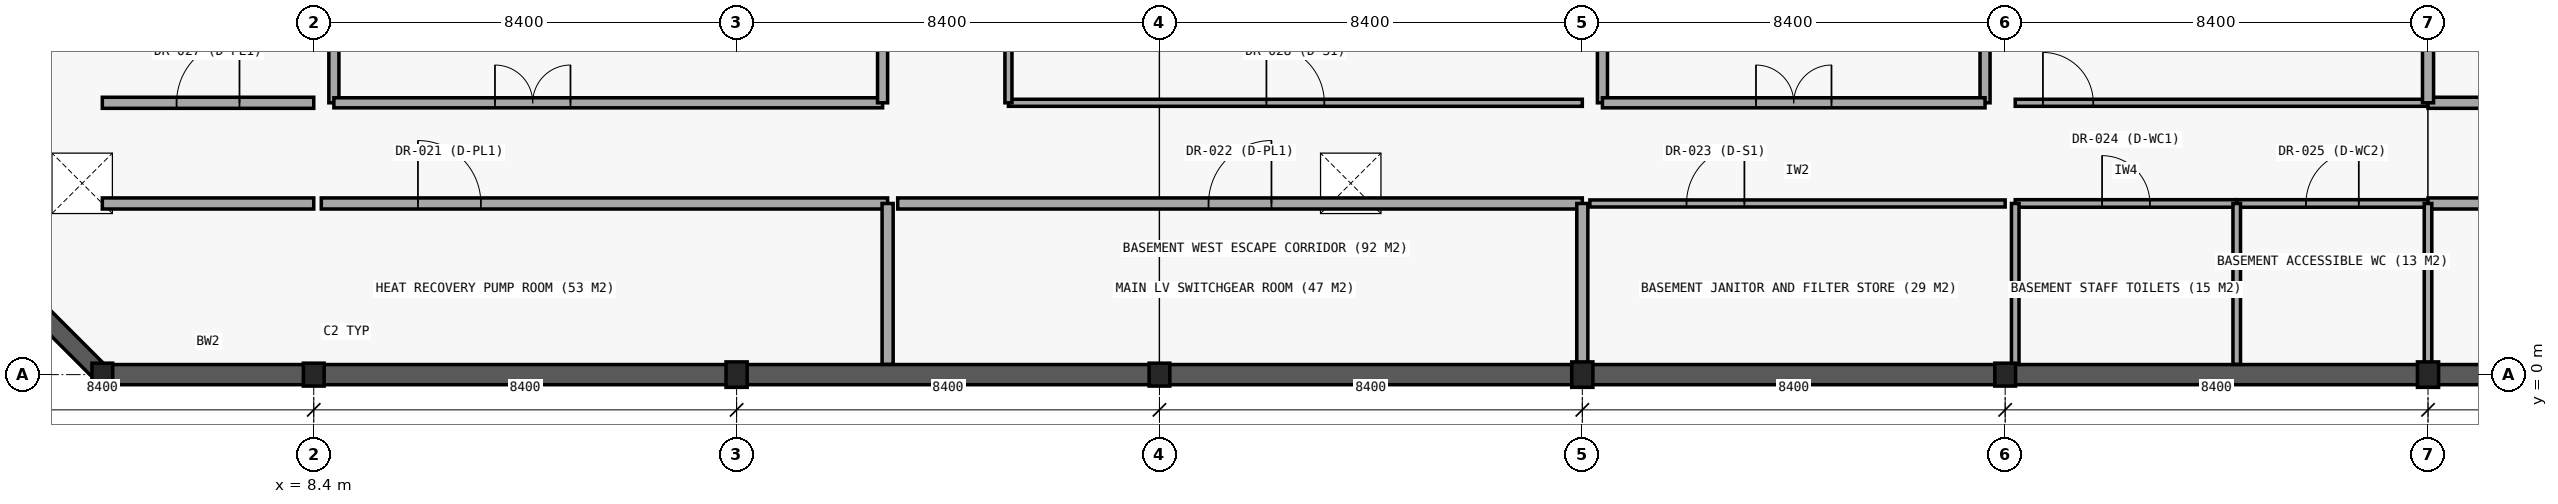
"""IFC4 building model, lengths in metres.
Left out: names, types, materials, properties, quantities, classifications, styles, units other than length and angle.
Written with IfcOpenShell. Run it as: python <this file> out.ifc"""

import sys

from ifc_helpers import new_model, si_unit, direction, frame, frame_2d, origin, origin_2d, place, context, subcontext, project, spatial, rectangle, i_section, extrude, element, fill, save


model = new_model("IFC4")
c1 = context("Model", 3, precision=1e-05, world=origin(), true_north=direction((0.0, 1.0)))
c2 = subcontext(c1, "Body", "Model", "MODEL_VIEW")
j1 = project(units=[si_unit("LENGTHUNIT", "METRE"), si_unit("PLANEANGLEUNIT", "RADIAN")], contexts=[c1])
p1 = place(None, origin())
s1 = spatial("IfcSite", under=j1, at=p1, CompositionType="ELEMENT")
p2 = place(p1, origin())
s2 = spatial("IfcBuilding", under=s1, at=p2, CompositionType="ELEMENT")
p3 = place(p2, frame((0.0, 0.0, -4.5)))
s3 = spatial("IfcBuildingStorey", under=s2, at=p3, CompositionType="ELEMENT", Elevation=-4.5)
p4 = place(p3, frame((4.2, 0.0, -0.35), z_axis=(0.0, 0.0, 1.0), x_axis=(1.0, 0.0, 0.0)))
e1 = element("IfcWall", 1, at=p4, inside=s3, PredefinedType="SOLIDWALL", context=c2, shape_type="SweptSolid", body=[
    extrude(rectangle(XDim=4.2, YDim=0.4, at=frame_2d((2.1, 0.0))), origin(), (0.0, 0.0, 1.0), 4.6),
])
p5 = place(p3, frame((8.4, 0.0, -0.35), z_axis=(0.0, 0.0, 1.0), x_axis=(1.0, 0.0, 0.0)))
e2 = element("IfcWall", 2, at=p5, inside=s3, PredefinedType="SOLIDWALL", context=c2, shape_type="SweptSolid", body=[
    extrude(rectangle(XDim=8.4, YDim=0.4, at=frame_2d((4.2, 0.0))), origin(), (0.0, 0.0, 1.0), 4.6),
])
p6 = place(p3, frame((16.8, 0.0, -0.35), z_axis=(0.0, 0.0, 1.0), x_axis=(1.0, 0.0, 0.0)))
e3 = element("IfcWall", 3, at=p6, inside=s3, PredefinedType="SOLIDWALL", context=c2, shape_type="SweptSolid", body=[
    extrude(rectangle(XDim=8.4, YDim=0.4, at=frame_2d((4.2, 0.0))), origin(), (0.0, 0.0, 1.0), 4.6),
])
p7 = place(p3, frame((25.2, 0.0, -0.35), z_axis=(0.0, 0.0, 1.0), x_axis=(1.0, 0.0, 0.0)))
e4 = element("IfcWall", 4, at=p7, inside=s3, PredefinedType="SOLIDWALL", context=c2, shape_type="SweptSolid", body=[
    extrude(rectangle(XDim=8.4, YDim=0.4, at=frame_2d((4.2, 0.0))), origin(), (0.0, 0.0, 1.0), 4.6),
])
for number, where, z_axis, x_axis in (
    (5, (33.6, 0.0, -0.35), (0.0, 0.0, 1.0), (1.0, 0.0, 0.0)),
    (6, (42.0, 0.0, -0.35), (0.0, 0.0, 1.0), (1.0, 0.0, 0.0)),
):
    element("IfcWall", number, at=place(p3, frame(where, z_axis=z_axis, x_axis=x_axis)), inside=s3, PredefinedType="SOLIDWALL", context=c2, shape_type="SweptSolid", body=[
        extrude(rectangle(XDim=8.4, YDim=0.4, at=frame_2d((4.2, 0.0))), origin(), (0.0, 0.0, 1.0), 4.6),
    ])
p8 = place(p3, frame((50.4, 0.0, -0.35), z_axis=(0.0, 0.0, 1.0), x_axis=(1.0, 0.0, 0.0)))
e7 = element("IfcWall", 7, at=p8, inside=s3, PredefinedType="SOLIDWALL", context=c2, shape_type="SweptSolid", body=[
    extrude(rectangle(XDim=8.4, YDim=0.4, at=frame_2d((4.2, 0.0))), origin(), (0.0, 0.0, 1.0), 4.6),
])
p9 = place(p3, frame((0.0, 4.2, -0.35), z_axis=(0.0, 0.0, 1.0), x_axis=(0.707106781187, -0.707106781187, 0.0)))
e8 = element("IfcWall", 8, at=p9, inside=s3, PredefinedType="SOLIDWALL", context=c2, shape_type="SweptSolid", body=[
    extrude(rectangle(XDim=5.94, YDim=0.35, at=frame_2d((2.97, 0.0))), origin(), (0.0, 0.0, 1.0), 4.6),
])
p10 = place(p3, frame((8.4, 0.0, -0.35), z_axis=(0.0, 0.0, 1.0), x_axis=(1.0, 0.0, 0.0)))
e9 = element("IfcColumn", 9, at=p10, inside=s3, PredefinedType="COLUMN", context=c2, shape_type="SweptSolid", body=[
    extrude(i_section(OverallWidth=0.412, OverallDepth=0.455, WebThickness=0.031, FlangeThickness=0.049, FilletRadius=0.015, at=origin_2d()), origin(), (0.0, 0.0, 1.0), 4.85),
])
p11 = place(p3, frame((16.8, 0.0, -0.35), z_axis=(0.0, 0.0, 1.0), x_axis=(1.0, 0.0, 0.0)))
e10 = element("IfcColumn", 10, at=p11, inside=s3, PredefinedType="COLUMN", context=c2, shape_type="SweptSolid", body=[
    extrude(i_section(OverallWidth=0.42, OverallDepth=0.505, WebThickness=0.037, FlangeThickness=0.059, FilletRadius=0.015, at=origin_2d()), origin(), (0.0, 0.0, 1.0), 4.85),
])
p12 = place(p3, frame((25.2, 0.0, -0.35), z_axis=(0.0, 0.0, 1.0), x_axis=(1.0, 0.0, 0.0)))
e11 = element("IfcColumn", 11, at=p12, inside=s3, PredefinedType="COLUMN", context=c2, shape_type="SweptSolid", body=[
    extrude(i_section(OverallWidth=0.412, OverallDepth=0.455, WebThickness=0.031, FlangeThickness=0.049, FilletRadius=0.015, at=origin_2d()), origin(), (0.0, 0.0, 1.0), 4.85),
])
p13 = place(p3, frame((33.6, 0.0, -0.35), z_axis=(0.0, 0.0, 1.0), x_axis=(1.0, 0.0, 0.0)))
e12 = element("IfcColumn", 12, at=p13, inside=s3, PredefinedType="COLUMN", context=c2, shape_type="SweptSolid", body=[
    extrude(i_section(OverallWidth=0.42, OverallDepth=0.505, WebThickness=0.037, FlangeThickness=0.059, FilletRadius=0.015, at=origin_2d()), origin(), (0.0, 0.0, 1.0), 4.85),
])
p14 = place(p3, frame((42.0, 0.0, -0.35), z_axis=(0.0, 0.0, 1.0), x_axis=(1.0, 0.0, 0.0)))
e13 = element("IfcColumn", 13, at=p14, inside=s3, PredefinedType="COLUMN", context=c2, shape_type="SweptSolid", body=[
    extrude(i_section(OverallWidth=0.412, OverallDepth=0.455, WebThickness=0.031, FlangeThickness=0.049, FilletRadius=0.015, at=origin_2d()), origin(), (0.0, 0.0, 1.0), 4.85),
])
p15 = place(p3, frame((50.4, 0.0, -0.35), z_axis=(0.0, 0.0, 1.0), x_axis=(1.0, 0.0, 0.0)))
e14 = element("IfcColumn", 14, at=p15, inside=s3, PredefinedType="COLUMN", context=c2, shape_type="SweptSolid", body=[
    extrude(i_section(OverallWidth=0.42, OverallDepth=0.505, WebThickness=0.037, FlangeThickness=0.059, FilletRadius=0.015, at=origin_2d()), origin(), (0.0, 0.0, 1.0), 4.85),
])
p16 = place(p3, frame((4.2, 0.0, -0.35), z_axis=(0.0, 0.0, 1.0), x_axis=(1.0, 0.0, 0.0)))
e15 = element("IfcColumn", 15, at=p16, inside=s3, PredefinedType="COLUMN", context=c2, shape_type="SweptSolid", body=[
    extrude(i_section(OverallWidth=0.412, OverallDepth=0.455, WebThickness=0.031, FlangeThickness=0.049, FilletRadius=0.015, at=origin_2d()), origin(), (0.0, 0.0, 1.0), 4.85),
])
p17 = place(p3, frame((8.8, 5.4, 0.0), z_axis=(0.0, 0.0, 1.0), x_axis=(0.0, 1.0, 0.0)))
e16 = element("IfcWall", 16, at=p17, inside=s3, PredefinedType="PARTITIONING", context=c2, shape_type="SweptSolid", body=[
    extrude(rectangle(XDim=2.85, YDim=0.2, at=frame_2d((1.425, 0.0))), origin(), (0.0, 0.0, 1.0), 3.82),
])
p18 = place(p3, frame((8.8, 5.4, 0.0), z_axis=(0.0, 0.0, 1.0), x_axis=(1.0, 0.0, 0.0)))
e17 = element("IfcWall", 17, at=p18, inside=s3, PredefinedType="PARTITIONING", context=c2, shape_type="SweptSolid", body=[
    extrude(rectangle(XDim=10.9, YDim=0.2, at=frame_2d((5.45, 0.0))), origin(), (0.0, 0.0, 1.0), 3.82),
])
p19 = place(p18, frame((3.2, 0.0, 0.0)))
e18 = element("IfcOpeningElement", 18, at=p19, cuts=e17, PredefinedType="OPENING", context=c2, shape_type="SweptSolid", body=[
    extrude(rectangle(XDim=1.5, YDim=2.2, at=frame_2d((0.75, 1.1))), frame((0.0, 0.11, 0.0), z_axis=(0.0, -1.0, 0.0), x_axis=(1.0, 0.0, 0.0)), (0.0, 0.0, 1.0), 0.22),
])
p20 = place(p3, frame((19.7, 5.4, 0.0), z_axis=(0.0, 0.0, 1.0), x_axis=(0.0, 1.0, 0.0)))
e19 = element("IfcWall", 19, at=p20, inside=s3, PredefinedType="PARTITIONING", context=c2, shape_type="SweptSolid", body=[
    extrude(rectangle(XDim=9.6, YDim=0.2, at=frame_2d((4.8, 0.0))), origin(), (0.0, 0.0, 1.0), 3.82),
])
for number, where, z_axis, x_axis in (
    (20, (34.0, 5.4, 0.0), (0.0, 0.0, 1.0), (0.0, 1.0, 0.0)),
    (21, (41.6, 5.4, 0.0), (0.0, 0.0, 1.0), (0.0, 1.0, 0.0)),
):
    element("IfcWall", number, at=place(p3, frame(where, z_axis=z_axis, x_axis=x_axis)), inside=s3, PredefinedType="PARTITIONING", context=c2, shape_type="SweptSolid", body=[
        extrude(rectangle(XDim=2.85, YDim=0.2, at=frame_2d((1.425, 0.0))), origin(), (0.0, 0.0, 1.0), 3.75),
    ])
p21 = place(p3, frame((34.0, 5.4, 0.0), z_axis=(0.0, 0.0, 1.0), x_axis=(1.0, 0.0, 0.0)))
e22 = element("IfcWall", 22, at=p21, inside=s3, PredefinedType="PARTITIONING", context=c2, shape_type="SweptSolid", body=[
    extrude(rectangle(XDim=7.6, YDim=0.2, at=frame_2d((3.8, 0.0))), origin(), (0.0, 0.0, 1.0), 3.82),
])
p22 = place(p21, frame((3.05, 0.0, 0.0)))
e23 = element("IfcOpeningElement", 23, at=p22, cuts=e22, PredefinedType="OPENING", context=c2, shape_type="SweptSolid", body=[
    extrude(rectangle(XDim=1.5, YDim=2.2, at=frame_2d((0.75, 1.1))), frame((0.0, 0.11, 0.0), z_axis=(0.0, -1.0, 0.0), x_axis=(1.0, 0.0, 0.0)), (0.0, 0.0, 1.0), 0.22),
])
p23 = place(p3, frame((4.2, 3.4, 0.0), z_axis=(0.0, 0.0, 1.0), x_axis=(1.0, 0.0, 0.0)))
e24 = element("IfcWall", 24, at=p23, inside=s3, PredefinedType="PARTITIONING", context=c2, shape_type="SweptSolid", body=[
    extrude(rectangle(XDim=4.2, YDim=0.22, at=frame_2d((2.1, 0.0))), origin(), (0.0, 0.0, 1.0), 3.8),
])
p24 = place(p3, frame((8.55, 3.4, 0.0), z_axis=(0.0, 0.0, 1.0), x_axis=(1.0, 0.0, 0.0)))
e25 = element("IfcWall", 25, at=p24, inside=s3, PredefinedType="PARTITIONING", context=c2, shape_type="SweptSolid", body=[
    extrude(rectangle(XDim=11.25, YDim=0.22, at=frame_2d((5.625, 0.0))), origin(), (0.0, 0.0, 1.0), 3.8),
])
p25 = place(p24, frame((1.92, 0.0, 0.0)))
e26 = element("IfcOpeningElement", 26, at=p25, cuts=e25, PredefinedType="OPENING", context=c2, shape_type="SweptSolid", body=[
    extrude(rectangle(XDim=1.25, YDim=2.2, at=frame_2d((0.625, 1.1))), frame((0.0, 0.12, 0.0), z_axis=(0.0, -1.0, 0.0), x_axis=(1.0, 0.0, 0.0)), (0.0, 0.0, 1.0), 0.24),
])
p26 = place(p3, frame((20.0, 3.4, 0.0), z_axis=(0.0, 0.0, 1.0), x_axis=(1.0, 0.0, 0.0)))
e27 = element("IfcWall", 27, at=p26, inside=s3, PredefinedType="PARTITIONING", context=c2, shape_type="SweptSolid", body=[
    extrude(rectangle(XDim=13.6, YDim=0.22, at=frame_2d((6.8, 0.0))), origin(), (0.0, 0.0, 1.0), 3.8),
])
p27 = place(p26, frame((6.175, 0.0, 0.0)))
e28 = element("IfcOpeningElement", 28, at=p27, cuts=e27, PredefinedType="OPENING", context=c2, shape_type="SweptSolid", body=[
    extrude(rectangle(XDim=1.25, YDim=2.2, at=frame_2d((0.625, 1.1))), frame((0.0, 0.12, 0.0), z_axis=(0.0, -1.0, 0.0), x_axis=(1.0, 0.0, 0.0)), (0.0, 0.0, 1.0), 0.24),
])
p28 = place(p3, frame((33.75, 3.4, 0.0), z_axis=(0.0, 0.0, 1.0), x_axis=(1.0, 0.0, 0.0)))
e29 = element("IfcWall", 29, at=p28, inside=s3, PredefinedType="PARTITIONING", context=c2, shape_type="SweptSolid", body=[
    extrude(rectangle(XDim=8.25, YDim=0.14, at=frame_2d((4.125, 0.0))), origin(), (0.0, 0.0, 1.0), 3.8),
])
p29 = place(p28, frame((1.92, 0.0, 0.0)))
e30 = element("IfcOpeningElement", 30, at=p29, cuts=e29, PredefinedType="OPENING", context=c2, shape_type="SweptSolid", body=[
    extrude(rectangle(XDim=1.15, YDim=2.15, at=frame_2d((0.575, 1.075))), frame((0.0, 0.08, 0.0), z_axis=(0.0, -1.0, 0.0), x_axis=(1.0, 0.0, 0.0)), (0.0, 0.0, 1.0), 0.16),
])
p30 = place(p3, frame((42.2, 3.4, 0.0), z_axis=(0.0, 0.0, 1.0), x_axis=(1.0, 0.0, 0.0)))
e31 = element("IfcWall", 31, at=p30, inside=s3, PredefinedType="PARTITIONING", context=c2, shape_type="SweptSolid", body=[
    extrude(rectangle(XDim=4.4, YDim=0.15, at=frame_2d((2.2, 0.0))), origin(), (0.0, 0.0, 1.0), 3.8),
])
p31 = place(p30, frame((1.725, 0.0, 0.0)))
e32 = element("IfcOpeningElement", 32, at=p31, cuts=e31, PredefinedType="OPENING", context=c2, shape_type="SweptSolid", body=[
    extrude(rectangle(XDim=0.95, YDim=2.1, at=frame_2d((0.475, 1.05))), frame((0.0, 0.085, 0.0), z_axis=(0.0, -1.0, 0.0), x_axis=(1.0, 0.0, 0.0)), (0.0, 0.0, 1.0), 0.17),
])
p32 = place(p3, frame((46.6, 3.4, 0.0), z_axis=(0.0, 0.0, 1.0), x_axis=(1.0, 0.0, 0.0)))
e33 = element("IfcWall", 33, at=p32, inside=s3, PredefinedType="PARTITIONING", context=c2, shape_type="SweptSolid", body=[
    extrude(rectangle(XDim=3.8, YDim=0.15, at=frame_2d((1.9, 0.0))), origin(), (0.0, 0.0, 1.0), 3.8),
])
p33 = place(p32, frame((1.375, 0.0, 0.0)))
e34 = element("IfcOpeningElement", 34, at=p33, cuts=e33, PredefinedType="OPENING", context=c2, shape_type="SweptSolid", body=[
    extrude(rectangle(XDim=1.05, YDim=2.15, at=frame_2d((0.525, 1.075))), frame((0.0, 0.085, 0.0), z_axis=(0.0, -1.0, 0.0), x_axis=(1.0, 0.0, 0.0)), (0.0, 0.0, 1.0), 0.17),
])
p34 = place(p3, frame((50.4, 3.4, 0.0), z_axis=(0.0, 0.0, 1.0), x_axis=(1.0, 0.0, 0.0)))
e35 = element("IfcWall", 35, at=p34, inside=s3, PredefinedType="PARTITIONING", context=c2, shape_type="SweptSolid", body=[
    extrude(rectangle(XDim=8.55, YDim=0.22, at=frame_2d((4.275, 0.0))), origin(), (0.0, 0.0, 1.0), 3.8),
])
p35 = place(p3, frame((4.2, 5.4, 0.0), z_axis=(0.0, 0.0, 1.0), x_axis=(1.0, 0.0, 0.0)))
e36 = element("IfcWall", 36, at=p35, inside=s3, PredefinedType="PARTITIONING", context=c2, shape_type="SweptSolid", body=[
    extrude(rectangle(XDim=4.2, YDim=0.22, at=frame_2d((2.1, 0.0))), origin(), (0.0, 0.0, 1.0), 3.8),
])
p36 = place(p35, frame((1.475, 0.0, 0.0)))
e37 = element("IfcOpeningElement", 37, at=p36, cuts=e36, PredefinedType="OPENING", context=c2, shape_type="SweptSolid", body=[
    extrude(rectangle(XDim=1.25, YDim=2.2, at=frame_2d((0.625, 1.1))), frame((0.0, 0.12, 0.0), z_axis=(0.0, -1.0, 0.0), x_axis=(1.0, 0.0, 0.0)), (0.0, 0.0, 1.0), 0.24),
])
p37 = place(p3, frame((22.2, 5.4, 0.0), z_axis=(0.0, 0.0, 1.0), x_axis=(1.0, 0.0, 0.0)))
e38 = element("IfcWall", 38, at=p37, inside=s3, PredefinedType="PARTITIONING", context=c2, shape_type="SweptSolid", body=[
    extrude(rectangle(XDim=11.4, YDim=0.14, at=frame_2d((5.7, 0.0))), origin(), (0.0, 0.0, 1.0), 3.8),
])
p38 = place(p37, frame((5.125, 0.0, 0.0)))
e39 = element("IfcOpeningElement", 39, at=p38, cuts=e38, PredefinedType="OPENING", context=c2, shape_type="SweptSolid", body=[
    extrude(rectangle(XDim=1.15, YDim=2.15, at=frame_2d((0.575, 1.075))), frame((0.0, 0.08, 0.0), z_axis=(0.0, -1.0, 0.0), x_axis=(1.0, 0.0, 0.0)), (0.0, 0.0, 1.0), 0.16),
])
p39 = place(p3, frame((42.2, 5.4, 0.0), z_axis=(0.0, 0.0, 1.0), x_axis=(1.0, 0.0, 0.0)))
e40 = element("IfcWall", 40, at=p39, inside=s3, PredefinedType="PARTITIONING", context=c2, shape_type="SweptSolid", body=[
    extrude(rectangle(XDim=8.2, YDim=0.14, at=frame_2d((4.1, 0.0))), origin(), (0.0, 0.0, 1.0), 3.8),
])
p40 = place(p39, frame((0.55, 0.0, 0.0)))
e41 = element("IfcOpeningElement", 41, at=p40, cuts=e40, PredefinedType="OPENING", context=c2, shape_type="SweptSolid", body=[
    extrude(rectangle(XDim=1.0, YDim=2.15, at=frame_2d((0.5, 1.075))), frame((0.0, 0.08, 0.0), z_axis=(0.0, -1.0, 0.0), x_axis=(1.0, 0.0, 0.0)), (0.0, 0.0, 1.0), 0.16),
])
p41 = place(p3, frame((50.4, 5.4, 0.0), z_axis=(0.0, 0.0, 1.0), x_axis=(1.0, 0.0, 0.0)))
e42 = element("IfcWall", 42, at=p41, inside=s3, PredefinedType="PARTITIONING", context=c2, shape_type="SweptSolid", body=[
    extrude(rectangle(XDim=8.55, YDim=0.22, at=frame_2d((4.275, 0.0))), origin(), (0.0, 0.0, 1.0), 3.79),
])
p42 = place(p3, frame((19.8, 0.205, 0.0), z_axis=(0.0, 0.0, 1.0), x_axis=(0.0, 1.0, 0.0)))
e43 = element("IfcWall", 43, at=p42, inside=s3, PredefinedType="PARTITIONING", context=c2, shape_type="SweptSolid", body=[
    extrude(rectangle(XDim=3.195, YDim=0.22, at=frame_2d((1.597, 0.0))), origin(), (0.0, 0.0, 1.0), 3.8),
])
p43 = place(p3, frame((22.2, 5.4, 0.0), z_axis=(0.0, 0.0, 1.0), x_axis=(0.0, 1.0, 0.0)))
e44 = element("IfcWall", 44, at=p43, inside=s3, PredefinedType="PARTITIONING", context=c2, shape_type="SweptSolid", body=[
    extrude(rectangle(XDim=11.25, YDim=0.14, at=frame_2d((5.625, 0.0))), origin(), (0.0, 0.0, 1.0), 3.8),
])
p44 = place(p3, frame((33.6, 0.205, 0.0), z_axis=(0.0, 0.0, 1.0), x_axis=(0.0, 1.0, 0.0)))
e45 = element("IfcWall", 45, at=p44, inside=s3, PredefinedType="PARTITIONING", context=c2, shape_type="SweptSolid", body=[
    extrude(rectangle(XDim=3.195, YDim=0.22, at=frame_2d((1.597, 0.0))), origin(), (0.0, 0.0, 1.0), 3.75),
])
p45 = place(p3, frame((42.2, 0.205, 0.0), z_axis=(0.0, 0.0, 1.0), x_axis=(0.0, 1.0, 0.0)))
e46 = element("IfcWall", 46, at=p45, inside=s3, PredefinedType="PARTITIONING", context=c2, shape_type="SweptSolid", body=[
    extrude(rectangle(XDim=3.195, YDim=0.15, at=frame_2d((1.597, 0.0))), origin(), (0.0, 0.0, 1.0), 3.75),
])
for number, where, z_axis, x_axis in (
    (47, (46.6, 0.205, 0.0), (0.0, 0.0, 1.0), (0.0, 1.0, 0.0)),
    (48, (50.4, 0.205, 0.0), (0.0, 0.0, 1.0), (0.0, 1.0, 0.0)),
):
    element("IfcWall", number, at=place(p3, frame(where, z_axis=z_axis, x_axis=x_axis)), inside=s3, PredefinedType="PARTITIONING", context=c2, shape_type="SweptSolid", body=[
        extrude(rectangle(XDim=3.195, YDim=0.15, at=frame_2d((1.597, 0.0))), origin(), (0.0, 0.0, 1.0), 3.8),
    ])
p46 = place(p3, frame((50.4, 5.4, 0.0), z_axis=(0.0, 0.0, 1.0), x_axis=(0.0, 1.0, 0.0)))
e49 = element("IfcWall", 49, at=p46, inside=s3, PredefinedType="PARTITIONING", context=c2, shape_type="SweptSolid", body=[
    extrude(rectangle(XDim=11.25, YDim=0.22, at=frame_2d((5.625, 0.0))), origin(), (0.0, 0.0, 1.0), 3.8),
])
p47 = place(p19, origin())
e50 = element("IfcDoor", 50, at=p47, inside=s3, OperationType="DOUBLE_DOOR_SINGLE_SWING", PredefinedType="DOOR", context=c2, shape_type="SweptSolid", body=[
    extrude(rectangle(XDim=1.5, YDim=2.2, at=frame_2d((0.75, 1.1))), frame((0.0, 0.025, 0.0), z_axis=(0.0, -1.0, 0.0), x_axis=(1.0, 0.0, 0.0)), (0.0, 0.0, 1.0), 0.05),
])
fill(e18, e50)
p48 = place(p22, origin())
e51 = element("IfcDoor", 51, at=p48, inside=s3, OperationType="DOUBLE_DOOR_SINGLE_SWING", PredefinedType="DOOR", context=c2, shape_type="SweptSolid", body=[
    extrude(rectangle(XDim=1.5, YDim=2.2, at=frame_2d((0.75, 1.1))), frame((0.0, 0.025, 0.0), z_axis=(0.0, -1.0, 0.0), x_axis=(1.0, 0.0, 0.0)), (0.0, 0.0, 1.0), 0.05),
])
fill(e23, e51)
p49 = place(p25, origin())
e52 = element("IfcDoor", 52, at=p49, inside=s3, OperationType="SINGLE_SWING_LEFT", PredefinedType="DOOR", context=c2, shape_type="SweptSolid", body=[
    extrude(rectangle(XDim=1.25, YDim=2.2, at=frame_2d((0.625, 1.1))), frame((0.0, 0.025, 0.0), z_axis=(0.0, -1.0, 0.0), x_axis=(1.0, 0.0, 0.0)), (0.0, 0.0, 1.0), 0.05),
])
fill(e26, e52)
p50 = place(p27, origin())
e53 = element("IfcDoor", 53, at=p50, inside=s3, OperationType="SINGLE_SWING_RIGHT", PredefinedType="DOOR", context=c2, shape_type="SweptSolid", body=[
    extrude(rectangle(XDim=1.25, YDim=2.2, at=frame_2d((0.625, 1.1))), frame((0.0, 0.025, 0.0), z_axis=(0.0, -1.0, 0.0), x_axis=(1.0, 0.0, 0.0)), (0.0, 0.0, 1.0), 0.05),
])
fill(e28, e53)
p51 = place(p29, origin())
e54 = element("IfcDoor", 54, at=p51, inside=s3, OperationType="SINGLE_SWING_RIGHT", PredefinedType="DOOR", context=c2, shape_type="SweptSolid", body=[
    extrude(rectangle(XDim=1.15, YDim=2.15, at=frame_2d((0.575, 1.075))), frame((0.0, 0.025, 0.0), z_axis=(0.0, -1.0, 0.0), x_axis=(1.0, 0.0, 0.0)), (0.0, 0.0, 1.0), 0.05),
])
fill(e30, e54)
p52 = place(p31, origin())
e55 = element("IfcDoor", 55, at=p52, inside=s3, OperationType="SINGLE_SWING_LEFT", PredefinedType="DOOR", context=c2, shape_type="SweptSolid", body=[
    extrude(rectangle(XDim=0.95, YDim=2.1, at=frame_2d((0.475, 1.05))), frame((0.0, 0.025, 0.0), z_axis=(0.0, -1.0, 0.0), x_axis=(1.0, 0.0, 0.0)), (0.0, 0.0, 1.0), 0.05),
])
fill(e32, e55)
p53 = place(p33, origin())
e56 = element("IfcDoor", 56, at=p53, inside=s3, OperationType="SINGLE_SWING_RIGHT", PredefinedType="DOOR", context=c2, shape_type="SweptSolid", body=[
    extrude(rectangle(XDim=1.05, YDim=2.15, at=frame_2d((0.525, 1.075))), frame((0.0, 0.025, 0.0), z_axis=(0.0, -1.0, 0.0), x_axis=(1.0, 0.0, 0.0)), (0.0, 0.0, 1.0), 0.05),
])
fill(e34, e56)
p54 = place(p36, origin())
e57 = element("IfcDoor", 57, at=p54, inside=s3, OperationType="SINGLE_SWING_RIGHT", PredefinedType="DOOR", context=c2, shape_type="SweptSolid", body=[
    extrude(rectangle(XDim=1.25, YDim=2.2, at=frame_2d((0.625, 1.1))), frame((0.0, 0.025, 0.0), z_axis=(0.0, -1.0, 0.0), x_axis=(1.0, 0.0, 0.0)), (0.0, 0.0, 1.0), 0.05),
])
fill(e37, e57)
p55 = place(p38, origin())
e58 = element("IfcDoor", 58, at=p55, inside=s3, OperationType="SINGLE_SWING_LEFT", PredefinedType="DOOR", context=c2, shape_type="SweptSolid", body=[
    extrude(rectangle(XDim=1.15, YDim=2.15, at=frame_2d((0.575, 1.075))), frame((0.0, 0.025, 0.0), z_axis=(0.0, -1.0, 0.0), x_axis=(1.0, 0.0, 0.0)), (0.0, 0.0, 1.0), 0.05),
])
fill(e39, e58)
p56 = place(p40, origin())
e59 = element("IfcDoor", 59, at=p56, inside=s3, OperationType="SINGLE_SWING_LEFT", PredefinedType="DOOR", context=c2, shape_type="SweptSolid", body=[
    extrude(rectangle(XDim=1.0, YDim=2.15, at=frame_2d((0.5, 1.075))), frame((0.0, 0.025, 0.0), z_axis=(0.0, -1.0, 0.0), x_axis=(1.0, 0.0, 0.0)), (0.0, 0.0, 1.0), 0.05),
])
fill(e41, e59)
save(model, sys.argv[1])
